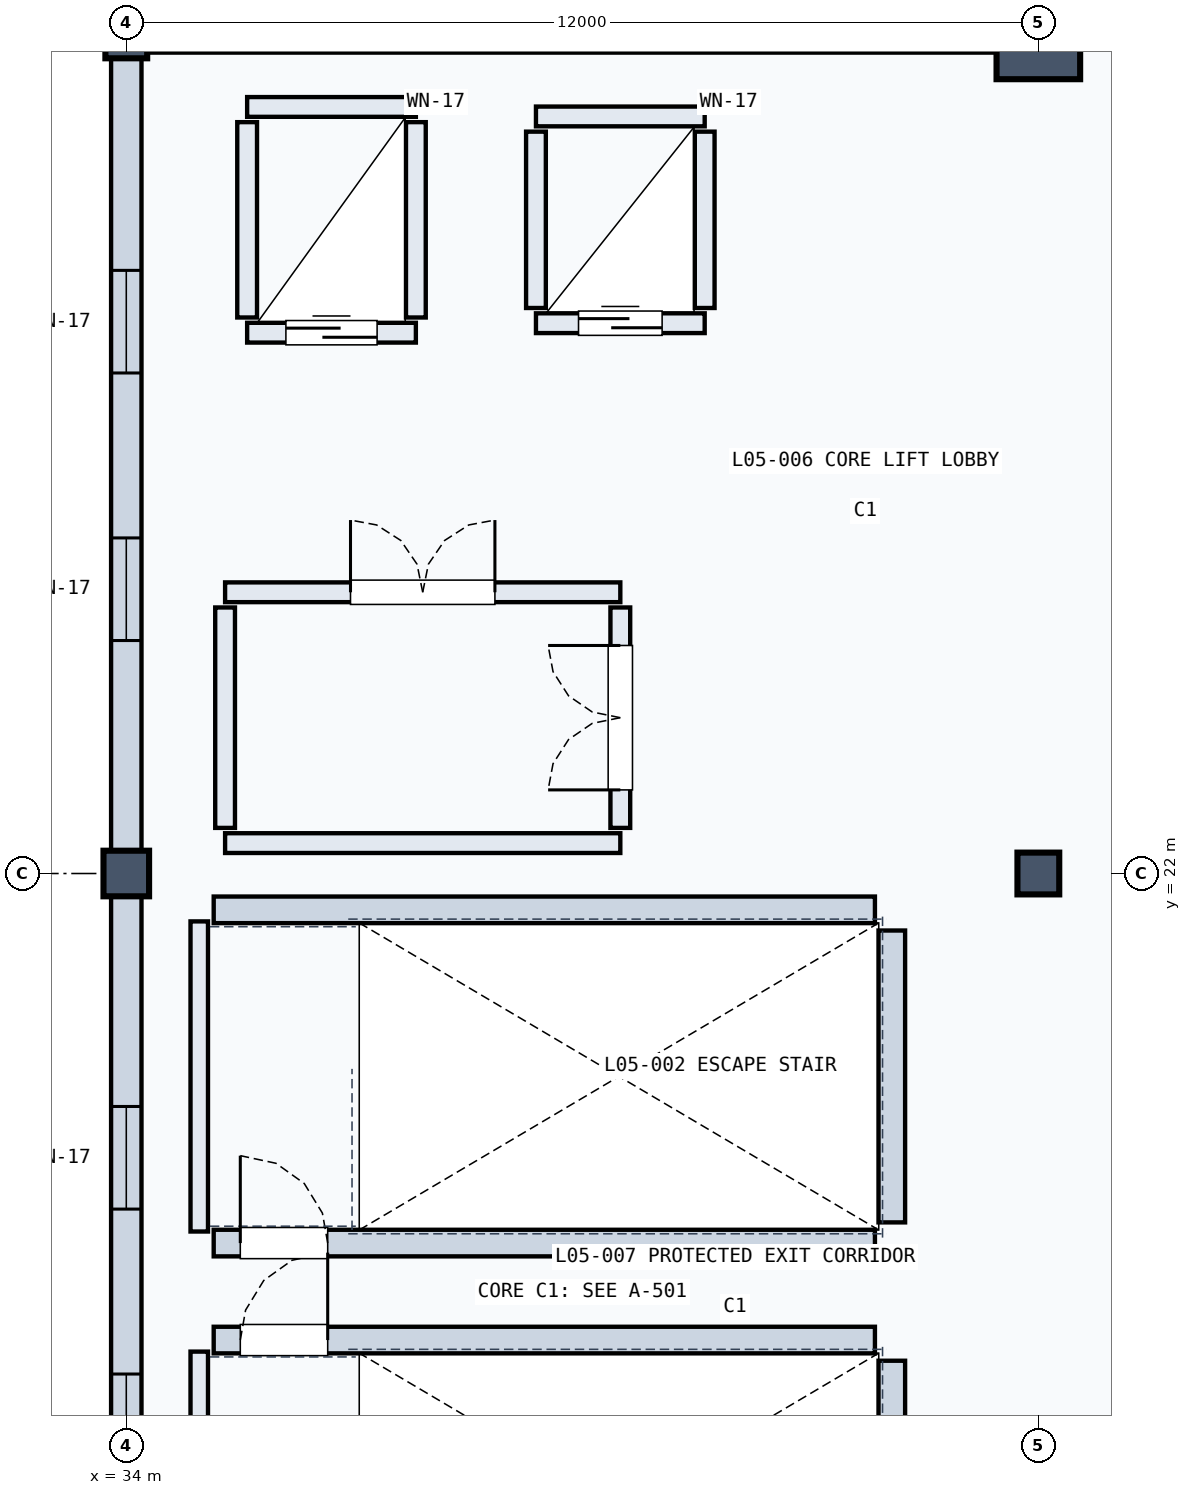
"""IFC4 building model, lengths in metres.
Left out: names, types, materials, properties, quantities, classifications, styles, units other than length and angle.
Written with IfcOpenShell. Run it as: python <this file> out.ifc"""

import sys

from ifc_helpers import new_model, si_unit, direction, frame, frame_2d, origin, origin_2d, place, context, subcontext, project, spatial, rectangle, extrude, element, fill, save


model = new_model("IFC4")
c1 = context("Model", 3, precision=1e-05, world=origin(), true_north=direction((0.0, 1.0)))
c2 = subcontext(c1, "Body", "Model", "MODEL_VIEW")
j1 = project(units=[si_unit("LENGTHUNIT", "METRE"), si_unit("PLANEANGLEUNIT", "RADIAN")], contexts=[c1])
p1 = place(None, origin())
s1 = spatial("IfcSite", under=j1, at=p1, CompositionType="ELEMENT")
p2 = place(p1, origin())
s2 = spatial("IfcBuilding", under=s1, at=p2, CompositionType="ELEMENT")
p3 = place(p2, frame((0.0, 0.0, 24.3)))
s3 = spatial("IfcBuildingStorey", under=s2, at=p3, CompositionType="ELEMENT", Elevation=24.3)
p4 = place(p3, frame((34.0, 22.0, 0.0), z_axis=(0.0, 0.0, 1.0), x_axis=(1.0, 0.0, 0.0)))
e1 = element("IfcColumn", 1, at=p4, inside=s3, PredefinedType="COLUMN", context=c2, shape_type="SweptSolid", body=[
    extrude(rectangle(XDim=0.6, YDim=0.6, at=origin_2d()), origin(), (0.0, 0.0, 1.0), 5.4),
])
for number, where, z_axis, x_axis in (
    (2, (34.0, 33.0, 0.0), (0.0, 0.0, 1.0), (1.0, 0.0, 0.0)),
    (3, (46.0, 22.0, 0.0), (0.0, 0.0, 1.0), (1.0, 0.0, 0.0)),
):
    element("IfcColumn", number, at=place(p3, frame(where, z_axis=z_axis, x_axis=x_axis)), inside=s3, PredefinedType="COLUMN", context=c2, shape_type="SweptSolid", body=[
        extrude(rectangle(XDim=0.55, YDim=0.55, at=origin_2d()), origin(), (0.0, 0.0, 1.0), 5.4),
    ])
p5 = place(p3, frame((46.0, 33.0, 0.0), z_axis=(0.0, 0.0, 1.0), x_axis=(1.0, 0.0, 0.0)))
e4 = element("IfcColumn", 4, at=p5, inside=s3, PredefinedType="COLUMN", context=c2, shape_type="SweptSolid", body=[
    extrude(rectangle(XDim=1.1, YDim=1.1, at=origin_2d()), origin(), (0.0, 0.0, 1.0), 5.4),
])
p6 = place(p3, frame((34.0, 11.22, 0.0), z_axis=(0.0, 0.0, 1.0), x_axis=(0.0, 1.0, 0.0)))
e5 = element("IfcWall", 5, at=p6, inside=s3, PredefinedType="SOLIDWALL", context=c2, shape_type="SweptSolid", body=[
    extrude(rectangle(XDim=10.56, YDim=0.4, at=frame_2d((5.28, 0.0))), origin(), (0.0, 0.0, 1.0), 5.185),
])
p7 = place(p6, frame((2.845, 0.0, 0.8)))
e6 = element("IfcOpeningElement", 6, at=p7, cuts=e5, PredefinedType="OPENING", context=c2, shape_type="SweptSolid", body=[
    extrude(rectangle(XDim=1.35, YDim=2.1, at=frame_2d((0.675, 1.05))), frame((0.0, 0.21, 0.0), z_axis=(0.0, -1.0, 0.0), x_axis=(1.0, 0.0, 0.0)), (0.0, 0.0, 1.0), 0.42),
])
p8 = place(p6, frame((6.365, 0.0, 0.8)))
e7 = element("IfcOpeningElement", 7, at=p8, cuts=e5, PredefinedType="OPENING", context=c2, shape_type="SweptSolid", body=[
    extrude(rectangle(XDim=1.35, YDim=2.1, at=frame_2d((0.675, 1.05))), frame((0.0, 0.21, 0.0), z_axis=(0.0, -1.0, 0.0), x_axis=(1.0, 0.0, 0.0)), (0.0, 0.0, 1.0), 0.42),
])
p9 = place(p3, frame((34.22, 33.0, 0.0), z_axis=(0.0, 0.0, 1.0), x_axis=(1.0, 0.0, 0.0)))
e8 = element("IfcWall", 8, at=p9, inside=s3, PredefinedType="SOLIDWALL", context=c2, shape_type="SweptSolid", body=[
    extrude(rectangle(XDim=11.56, YDim=0.4, at=frame_2d((5.78, 0.0))), origin(), (0.0, 0.0, 1.0), 5.185),
])
p10 = place(p9, frame((3.178, 0.0, 0.8)))
e9 = element("IfcOpeningElement", 9, at=p10, cuts=e8, PredefinedType="OPENING", context=c2, shape_type="SweptSolid", body=[
    extrude(rectangle(XDim=1.35, YDim=2.1, at=frame_2d((0.675, 1.05))), frame((0.0, 0.21, 0.0), z_axis=(0.0, -1.0, 0.0), x_axis=(1.0, 0.0, 0.0)), (0.0, 0.0, 1.0), 0.42),
])
p11 = place(p9, frame((7.032, 0.0, 0.8)))
e10 = element("IfcOpeningElement", 10, at=p11, cuts=e8, PredefinedType="OPENING", context=c2, shape_type="SweptSolid", body=[
    extrude(rectangle(XDim=1.35, YDim=2.1, at=frame_2d((0.675, 1.05))), frame((0.0, 0.21, 0.0), z_axis=(0.0, -1.0, 0.0), x_axis=(1.0, 0.0, 0.0)), (0.0, 0.0, 1.0), 0.42),
])
p12 = place(p3, frame((34.0, 22.22, 0.0), z_axis=(0.0, 0.0, 1.0), x_axis=(0.0, 1.0, 0.0)))
e11 = element("IfcWall", 11, at=p12, inside=s3, PredefinedType="SOLIDWALL", context=c2, shape_type="SweptSolid", body=[
    extrude(rectangle(XDim=10.56, YDim=0.4, at=frame_2d((5.28, 0.0))), origin(), (0.0, 0.0, 1.0), 5.185),
])
p13 = place(p12, frame((2.845, 0.0, 0.8)))
e12 = element("IfcOpeningElement", 12, at=p13, cuts=e11, PredefinedType="OPENING", context=c2, shape_type="SweptSolid", body=[
    extrude(rectangle(XDim=1.35, YDim=2.1, at=frame_2d((0.675, 1.05))), frame((0.0, 0.21, 0.0), z_axis=(0.0, -1.0, 0.0), x_axis=(1.0, 0.0, 0.0)), (0.0, 0.0, 1.0), 0.42),
])
p14 = place(p12, frame((6.365, 0.0, 0.8)))
e13 = element("IfcOpeningElement", 13, at=p14, cuts=e11, PredefinedType="OPENING", context=c2, shape_type="SweptSolid", body=[
    extrude(rectangle(XDim=1.35, YDim=2.1, at=frame_2d((0.675, 1.05))), frame((0.0, 0.21, 0.0), z_axis=(0.0, -1.0, 0.0), x_axis=(1.0, 0.0, 0.0)), (0.0, 0.0, 1.0), 0.42),
])
p15 = place(p3, frame((34.96, 11.63, 0.0), z_axis=(0.0, 0.0, 1.0), x_axis=(0.0, 1.0, 0.0)))
e14 = element("IfcWall", 14, at=p15, inside=s3, PredefinedType="SOLIDWALL", context=c2, shape_type="SweptSolid", body=[
    extrude(rectangle(XDim=4.08, YDim=0.23, at=frame_2d((2.04, 0.0))), origin(), (0.0, 0.0, 1.0), 5.18),
])
p16 = place(p3, frame((44.072, 11.05, 0.0), z_axis=(0.0, 0.0, 1.0), x_axis=(0.0, 1.0, 0.0)))
e15 = element("IfcWall", 15, at=p16, inside=s3, PredefinedType="SOLIDWALL", context=c2, shape_type="SweptSolid", body=[
    extrude(rectangle(XDim=4.54, YDim=0.35, at=frame_2d((2.27, 0.0))), origin(), (0.0, 0.0, 1.0), 5.18),
])
p17 = place(p3, frame((35.15, 15.862, 0.0), z_axis=(0.0, 0.0, 1.0), x_axis=(1.0, 0.0, 0.0)))
e16 = element("IfcWall", 16, at=p17, inside=s3, PredefinedType="SOLIDWALL", context=c2, shape_type="SweptSolid", body=[
    extrude(rectangle(XDim=8.7, YDim=0.35, at=frame_2d((4.35, 0.0))), origin(), (0.0, 0.0, 1.0), 5.18),
])
p18 = place(p17, frame((0.35, 0.0, 0.0)))
e17 = element("IfcOpeningElement", 17, at=p18, cuts=e16, PredefinedType="OPENING", context=c2, shape_type="SweptSolid", body=[
    extrude(rectangle(XDim=1.15, YDim=2.2, at=frame_2d((0.575, 1.1))), frame((0.0, 0.185, 0.0), z_axis=(0.0, -1.0, 0.0), x_axis=(1.0, 0.0, 0.0)), (0.0, 0.0, 1.0), 0.37),
])
p19 = place(p3, frame((34.96, 17.29, 0.0), z_axis=(0.0, 0.0, 1.0), x_axis=(0.0, 1.0, 0.0)))
e18 = element("IfcWall", 18, at=p19, inside=s3, PredefinedType="SOLIDWALL", context=c2, shape_type="SweptSolid", body=[
    extrude(rectangle(XDim=4.08, YDim=0.23, at=frame_2d((2.04, 0.0))), origin(), (0.0, 0.0, 1.0), 5.18),
])
p20 = place(p3, frame((44.072, 17.41, 0.0), z_axis=(0.0, 0.0, 1.0), x_axis=(0.0, 1.0, 0.0)))
e19 = element("IfcWall", 19, at=p20, inside=s3, PredefinedType="SOLIDWALL", context=c2, shape_type="SweptSolid", body=[
    extrude(rectangle(XDim=3.84, YDim=0.35, at=frame_2d((1.92, 0.0))), origin(), (0.0, 0.0, 1.0), 5.18),
])
p21 = place(p3, frame((35.15, 17.138, 0.0), z_axis=(0.0, 0.0, 1.0), x_axis=(1.0, 0.0, 0.0)))
e20 = element("IfcWall", 20, at=p21, inside=s3, PredefinedType="SOLIDWALL", context=c2, shape_type="SweptSolid", body=[
    extrude(rectangle(XDim=8.7, YDim=0.35, at=frame_2d((4.35, 0.0))), origin(), (0.0, 0.0, 1.0), 5.18),
])
p22 = place(p21, frame((0.35, 0.0, 0.0)))
e21 = element("IfcOpeningElement", 21, at=p22, cuts=e20, PredefinedType="OPENING", context=c2, shape_type="SweptSolid", body=[
    extrude(rectangle(XDim=1.15, YDim=2.2, at=frame_2d((0.575, 1.1))), frame((0.0, 0.185, 0.0), z_axis=(0.0, -1.0, 0.0), x_axis=(1.0, 0.0, 0.0)), (0.0, 0.0, 1.0), 0.37),
])
p23 = place(p3, frame((35.15, 21.522, 0.0), z_axis=(0.0, 0.0, 1.0), x_axis=(1.0, 0.0, 0.0)))
e22 = element("IfcWall", 22, at=p23, inside=s3, PredefinedType="SOLIDWALL", context=c2, shape_type="SweptSolid", body=[
    extrude(rectangle(XDim=8.7, YDim=0.35, at=frame_2d((4.35, 0.0))), origin(), (0.0, 0.0, 1.0), 5.18),
])
p24 = place(p3, frame((35.59, 29.115, 0.0), z_axis=(0.0, 0.0, 1.0), x_axis=(1.0, 0.0, 0.0)))
e23 = element("IfcWall", 23, at=p24, inside=s3, PredefinedType="SOLIDWALL", context=c2, shape_type="SweptSolid", body=[
    extrude(rectangle(XDim=2.22, YDim=0.26, at=frame_2d((1.11, 0.0))), origin(), (0.0, 0.0, 1.0), 5.18),
])
p25 = place(p24, frame((0.51, 0.0, 0.0)))
e24 = element("IfcOpeningElement", 24, at=p25, cuts=e23, PredefinedType="OPENING", context=c2, shape_type="SweptSolid", body=[
    extrude(rectangle(XDim=1.2, YDim=2.2, at=frame_2d((0.6, 1.1))), frame((0.0, 0.14, 0.0), z_axis=(0.0, -1.0, 0.0), x_axis=(1.0, 0.0, 0.0)), (0.0, 0.0, 1.0), 0.28),
])
p26 = place(p3, frame((35.59, 32.085, 0.0), z_axis=(0.0, 0.0, 1.0), x_axis=(1.0, 0.0, 0.0)))
e25 = element("IfcWall", 25, at=p26, inside=s3, PredefinedType="SOLIDWALL", context=c2, shape_type="SweptSolid", body=[
    extrude(rectangle(XDim=2.22, YDim=0.26, at=frame_2d((1.11, 0.0))), origin(), (0.0, 0.0, 1.0), 5.18),
])
for number, where, z_axis, x_axis in (
    (26, (35.59, 29.315, 0.0), (0.0, 0.0, 1.0), (0.0, 1.0, 0.0)),
    (27, (37.81, 29.315, 0.0), (0.0, 0.0, 1.0), (0.0, 1.0, 0.0)),
):
    element("IfcWall", number, at=place(p3, frame(where, z_axis=z_axis, x_axis=x_axis)), inside=s3, PredefinedType="SOLIDWALL", context=c2, shape_type="SweptSolid", body=[
        extrude(rectangle(XDim=2.57, YDim=0.26, at=frame_2d((1.285, 0.0))), origin(), (0.0, 0.0, 1.0), 5.18),
    ])
p27 = place(p3, frame((39.39, 29.24, 0.0), z_axis=(0.0, 0.0, 1.0), x_axis=(1.0, 0.0, 0.0)))
e28 = element("IfcWall", 28, at=p27, inside=s3, PredefinedType="SOLIDWALL", context=c2, shape_type="SweptSolid", body=[
    extrude(rectangle(XDim=2.22, YDim=0.26, at=frame_2d((1.11, 0.0))), origin(), (0.0, 0.0, 1.0), 5.18),
])
p28 = place(p27, frame((0.56, 0.0, 0.0)))
e29 = element("IfcOpeningElement", 29, at=p28, cuts=e28, PredefinedType="OPENING", context=c2, shape_type="SweptSolid", body=[
    extrude(rectangle(XDim=1.1, YDim=2.15, at=frame_2d((0.55, 1.075))), frame((0.0, 0.14, 0.0), z_axis=(0.0, -1.0, 0.0), x_axis=(1.0, 0.0, 0.0)), (0.0, 0.0, 1.0), 0.28),
])
p29 = place(p3, frame((39.39, 31.96, 0.0), z_axis=(0.0, 0.0, 1.0), x_axis=(1.0, 0.0, 0.0)))
e30 = element("IfcWall", 30, at=p29, inside=s3, PredefinedType="SOLIDWALL", context=c2, shape_type="SweptSolid", body=[
    extrude(rectangle(XDim=2.22, YDim=0.26, at=frame_2d((1.11, 0.0))), origin(), (0.0, 0.0, 1.0), 5.18),
])
for number, where, z_axis, x_axis in (
    (31, (39.39, 29.44, 0.0), (0.0, 0.0, 1.0), (0.0, 1.0, 0.0)),
    (32, (41.61, 29.44, 0.0), (0.0, 0.0, 1.0), (0.0, 1.0, 0.0)),
):
    element("IfcWall", number, at=place(p3, frame(where, z_axis=z_axis, x_axis=x_axis)), inside=s3, PredefinedType="SOLIDWALL", context=c2, shape_type="SweptSolid", body=[
        extrude(rectangle(XDim=2.32, YDim=0.26, at=frame_2d((1.16, 0.0))), origin(), (0.0, 0.0, 1.0), 5.18),
    ])
p30 = place(p3, frame((35.3, 25.7, 0.0), z_axis=(0.0, 0.0, 1.0), x_axis=(1.0, 0.0, 0.0)))
e33 = element("IfcWall", 33, at=p30, inside=s3, PredefinedType="SOLIDWALL", context=c2, shape_type="SweptSolid", body=[
    extrude(rectangle(XDim=5.2, YDim=0.26, at=frame_2d((2.6, 0.0))), origin(), (0.0, 0.0, 1.0), 5.18),
])
p31 = place(p30, frame((1.65, 0.0, 0.0)))
e34 = element("IfcOpeningElement", 34, at=p31, cuts=e33, PredefinedType="OPENING", context=c2, shape_type="SweptSolid", body=[
    extrude(rectangle(XDim=1.9, YDim=2.2, at=frame_2d((0.95, 1.1))), frame((0.0, 0.14, 0.0), z_axis=(0.0, -1.0, 0.0), x_axis=(1.0, 0.0, 0.0)), (0.0, 0.0, 1.0), 0.28),
])
p32 = place(p3, frame((35.3, 22.4, 0.0), z_axis=(0.0, 0.0, 1.0), x_axis=(1.0, 0.0, 0.0)))
e35 = element("IfcWall", 35, at=p32, inside=s3, PredefinedType="SOLIDWALL", context=c2, shape_type="SweptSolid", body=[
    extrude(rectangle(XDim=5.2, YDim=0.26, at=frame_2d((2.6, 0.0))), origin(), (0.0, 0.0, 1.0), 5.18),
])
p33 = place(p3, frame((35.3, 22.6, 0.0), z_axis=(0.0, 0.0, 1.0), x_axis=(0.0, 1.0, 0.0)))
e36 = element("IfcWall", 36, at=p33, inside=s3, PredefinedType="SOLIDWALL", context=c2, shape_type="SweptSolid", body=[
    extrude(rectangle(XDim=2.9, YDim=0.26, at=frame_2d((1.45, 0.0))), origin(), (0.0, 0.0, 1.0), 5.18),
])
p34 = place(p3, frame((40.5, 22.6, 0.0), z_axis=(0.0, 0.0, 1.0), x_axis=(0.0, 1.0, 0.0)))
e37 = element("IfcWall", 37, at=p34, inside=s3, PredefinedType="SOLIDWALL", context=c2, shape_type="SweptSolid", body=[
    extrude(rectangle(XDim=2.9, YDim=0.26, at=frame_2d((1.45, 0.0))), origin(), (0.0, 0.0, 1.0), 5.18),
])
p35 = place(p34, frame((0.5, 0.0, 0.0)))
e38 = element("IfcOpeningElement", 38, at=p35, cuts=e37, PredefinedType="OPENING", context=c2, shape_type="SweptSolid", body=[
    extrude(rectangle(XDim=1.9, YDim=2.2, at=frame_2d((0.95, 1.1))), frame((0.0, 0.14, 0.0), z_axis=(0.0, -1.0, 0.0), x_axis=(1.0, 0.0, 0.0)), (0.0, 0.0, 1.0), 0.28),
])
p36 = place(p7, origin())
e39 = element("IfcWindow", 39, at=p36, inside=s3, PartitioningType="SINGLE_PANEL", PredefinedType="WINDOW", context=c2, shape_type="SweptSolid", body=[
    extrude(rectangle(XDim=1.35, YDim=2.1, at=frame_2d((0.675, 1.05))), frame((0.0, 0.03, 0.0), z_axis=(0.0, -1.0, 0.0), x_axis=(1.0, 0.0, 0.0)), (0.0, 0.0, 1.0), 0.06),
])
fill(e6, e39)
p37 = place(p8, origin())
e40 = element("IfcWindow", 40, at=p37, inside=s3, PartitioningType="SINGLE_PANEL", PredefinedType="WINDOW", context=c2, shape_type="SweptSolid", body=[
    extrude(rectangle(XDim=1.35, YDim=2.1, at=frame_2d((0.675, 1.05))), frame((0.0, 0.03, 0.0), z_axis=(0.0, -1.0, 0.0), x_axis=(1.0, 0.0, 0.0)), (0.0, 0.0, 1.0), 0.06),
])
fill(e7, e40)
p38 = place(p13, origin())
e41 = element("IfcWindow", 41, at=p38, inside=s3, PartitioningType="SINGLE_PANEL", PredefinedType="WINDOW", context=c2, shape_type="SweptSolid", body=[
    extrude(rectangle(XDim=1.35, YDim=2.1, at=frame_2d((0.675, 1.05))), frame((0.0, 0.03, 0.0), z_axis=(0.0, -1.0, 0.0), x_axis=(1.0, 0.0, 0.0)), (0.0, 0.0, 1.0), 0.06),
])
fill(e12, e41)
p39 = place(p14, origin())
e42 = element("IfcWindow", 42, at=p39, inside=s3, PartitioningType="SINGLE_PANEL", PredefinedType="WINDOW", context=c2, shape_type="SweptSolid", body=[
    extrude(rectangle(XDim=1.35, YDim=2.1, at=frame_2d((0.675, 1.05))), frame((0.0, 0.03, 0.0), z_axis=(0.0, -1.0, 0.0), x_axis=(1.0, 0.0, 0.0)), (0.0, 0.0, 1.0), 0.06),
])
fill(e13, e42)
p40 = place(p18, origin())
e43 = element("IfcDoor", 43, at=p40, inside=s3, OperationType="SINGLE_SWING_RIGHT", PredefinedType="DOOR", context=c2, shape_type="SweptSolid", body=[
    extrude(rectangle(XDim=1.15, YDim=2.2, at=frame_2d((0.575, 1.1))), frame((0.0, 0.025, 0.0), z_axis=(0.0, -1.0, 0.0), x_axis=(1.0, 0.0, 0.0)), (0.0, 0.0, 1.0), 0.05),
])
fill(e17, e43)
p41 = place(p22, origin())
e44 = element("IfcDoor", 44, at=p41, inside=s3, OperationType="SINGLE_SWING_LEFT", PredefinedType="DOOR", context=c2, shape_type="SweptSolid", body=[
    extrude(rectangle(XDim=1.15, YDim=2.2, at=frame_2d((0.575, 1.1))), frame((0.0, 0.025, 0.0), z_axis=(0.0, -1.0, 0.0), x_axis=(1.0, 0.0, 0.0)), (0.0, 0.0, 1.0), 0.05),
])
fill(e21, e44)
p42 = place(p25, origin())
e45 = element("IfcDoor", 45, at=p42, inside=s3, OperationType="SLIDING_TO_LEFT", PredefinedType="DOOR", context=c2, shape_type="SweptSolid", body=[
    extrude(rectangle(XDim=1.2, YDim=2.2, at=frame_2d((0.6, 1.1))), frame((0.0, 0.025, 0.0), z_axis=(0.0, -1.0, 0.0), x_axis=(1.0, 0.0, 0.0)), (0.0, 0.0, 1.0), 0.05),
])
fill(e24, e45)
p43 = place(p28, origin())
e46 = element("IfcDoor", 46, at=p43, inside=s3, OperationType="SLIDING_TO_LEFT", PredefinedType="DOOR", context=c2, shape_type="SweptSolid", body=[
    extrude(rectangle(XDim=1.1, YDim=2.15, at=frame_2d((0.55, 1.075))), frame((0.0, 0.025, 0.0), z_axis=(0.0, -1.0, 0.0), x_axis=(1.0, 0.0, 0.0)), (0.0, 0.0, 1.0), 0.05),
])
fill(e29, e46)
p44 = place(p31, origin())
e47 = element("IfcDoor", 47, at=p44, inside=s3, OperationType="DOUBLE_DOOR_SINGLE_SWING", PredefinedType="DOOR", context=c2, shape_type="SweptSolid", body=[
    extrude(rectangle(XDim=1.9, YDim=2.2, at=frame_2d((0.95, 1.1))), frame((0.0, 0.025, 0.0), z_axis=(0.0, -1.0, 0.0), x_axis=(1.0, 0.0, 0.0)), (0.0, 0.0, 1.0), 0.05),
])
fill(e34, e47)
p45 = place(p35, origin())
e48 = element("IfcDoor", 48, at=p45, inside=s3, OperationType="DOUBLE_DOOR_SINGLE_SWING", PredefinedType="DOOR", context=c2, shape_type="SweptSolid", body=[
    extrude(rectangle(XDim=1.9, YDim=2.2, at=frame_2d((0.95, 1.1))), frame((0.0, 0.025, 0.0), z_axis=(0.0, -1.0, 0.0), x_axis=(1.0, 0.0, 0.0)), (0.0, 0.0, 1.0), 0.05),
])
fill(e38, e48)
save(model, sys.argv[1])
